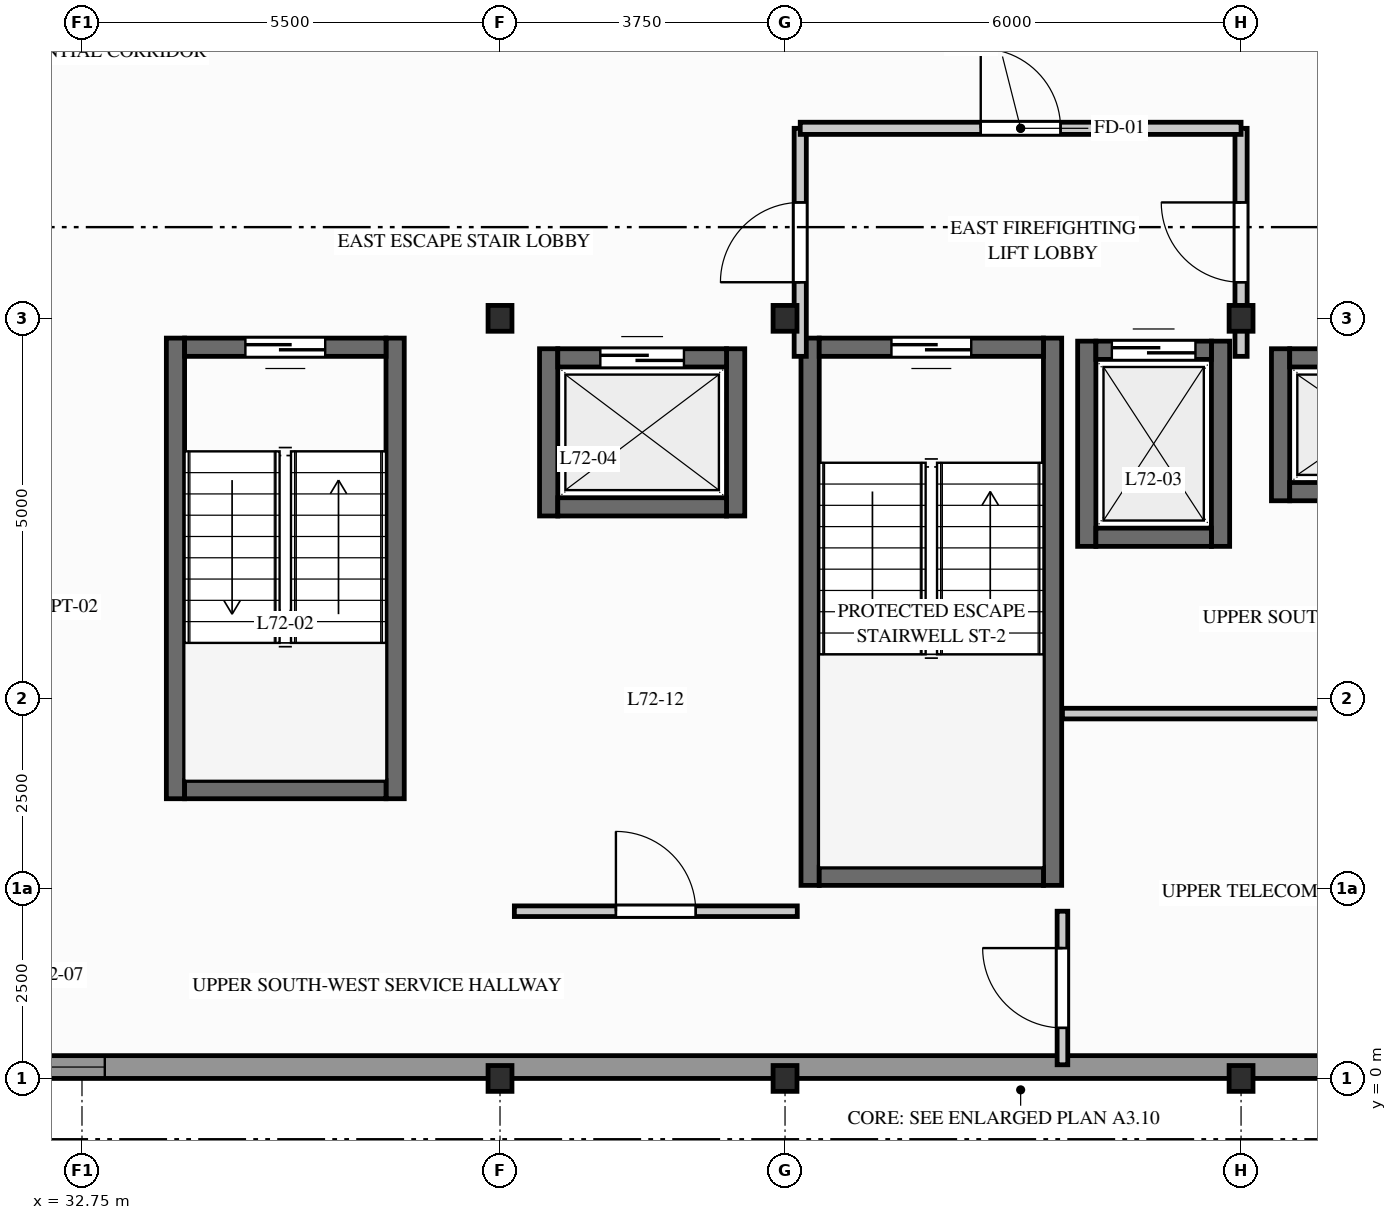
"""IFC4 building model, lengths in metres.
Left out: names, types, materials, properties, quantities, classifications, styles, units other than length and angle.
Written with IfcOpenShell. Run it as: python <this file> out.ifc"""

import sys

from ifc_helpers import new_model, si_unit, direction, frame, frame_2d, origin, origin_2d, place, context, subcontext, project, spatial, rectangle, i_section, extrude, element, fill, save


model = new_model("IFC4")
c1 = context("Model", 3, precision=1e-05, world=origin(), true_north=direction((0.0, 1.0)))
c2 = subcontext(c1, "Body", "Model", "MODEL_VIEW")
j1 = project(units=[si_unit("LENGTHUNIT", "METRE"), si_unit("PLANEANGLEUNIT", "RADIAN")], contexts=[c1])
p1 = place(None, origin())
s1 = spatial("IfcSite", under=j1, at=p1, CompositionType="ELEMENT")
p2 = place(p1, origin())
s2 = spatial("IfcBuilding", under=s1, at=p2, CompositionType="ELEMENT")
p3 = place(p2, frame((0.0, 0.0, 236.6)))
s3 = spatial("IfcBuildingStorey", under=s2, at=p3, CompositionType="ELEMENT", Elevation=236.6)
for number, where, z_axis, x_axis in (
    (1, (38.25, 0.0, 0.0), (0.0, 0.0, 1.0), (1.0, 0.0, 0.0)),
    (2, (38.25, 10.0, 0.0), (0.0, 0.0, 1.0), (1.0, 0.0, 0.0)),
    (3, (42.0, 0.0, 0.0), (0.0, 0.0, 1.0), (1.0, 0.0, 0.0)),
    (4, (42.0, 10.0, 0.0), (0.0, 0.0, 1.0), (1.0, 0.0, 0.0)),
    (5, (48.0, 0.0, 0.0), (0.0, 0.0, 1.0), (1.0, 0.0, 0.0)),
    (6, (48.0, 10.0, 0.0), (0.0, 0.0, 1.0), (1.0, 0.0, 0.0)),
):
    element("IfcColumn", number, at=place(p3, frame(where, z_axis=z_axis, x_axis=x_axis)), inside=s3, PredefinedType="COLUMN", context=c2, shape_type="SweptSolid", body=[
        extrude(i_section(OverallWidth=0.314, OverallDepth=0.34, WebThickness=0.019, FlangeThickness=0.031, FilletRadius=0.015, at=origin_2d()), origin(), (0.0, 0.0, 1.0), 3.45),
    ])
p4 = place(p3, frame((29.75, 0.15, 0.0), z_axis=(0.0, 0.0, 1.0), x_axis=(1.0, 0.0, 0.0)))
e7 = element("IfcWall", 7, at=p4, inside=s3, PredefinedType="STANDARD", context=c2, shape_type="SweptSolid", body=[
    extrude(rectangle(XDim=27.75, YDim=0.3, at=frame_2d((13.875, 0.0))), origin(), (0.0, 0.0, 1.0), 2.635),
])
p5 = place(p4, frame((2.5, 0.0, 1.016)))
e8 = element("IfcOpeningElement", 8, at=p5, cuts=e7, PredefinedType="OPENING", context=c2, shape_type="SweptSolid", body=[
    extrude(rectangle(XDim=0.8, YDim=1.4, at=frame_2d((0.4, 0.7))), frame((0.0, 0.16, 0.0), z_axis=(0.0, -1.0, 0.0), x_axis=(1.0, 0.0, 0.0)), (0.0, 0.0, 1.0), 0.32),
])
p6 = place(p4, frame((19.95, 0.0, 0.616)))
e9 = element("IfcOpeningElement", 9, at=p6, cuts=e7, PredefinedType="OPENING", context=c2, shape_type="SweptSolid", body=[
    extrude(rectangle(XDim=1.5, YDim=1.8, at=frame_2d((0.75, 0.9))), frame((0.0, 0.16, 0.0), z_axis=(0.0, -1.0, 0.0), x_axis=(1.0, 0.0, 0.0)), (0.0, 0.0, 1.0), 0.32),
])
for number, where, z_axis, x_axis in (
    (10, (42.33, 2.54, 0.0), (0.0, 0.0, 1.0), (0.0, 1.0, 0.0)),
    (11, (45.52, 2.54, 0.0), (0.0, 0.0, 1.0), (0.0, 1.0, 0.0)),
):
    element("IfcWall", number, at=place(p3, frame(where, z_axis=z_axis, x_axis=x_axis)), inside=s3, PredefinedType="SHEAR", context=c2, shape_type="SweptSolid", body=[
        extrude(rectangle(XDim=7.2, YDim=0.24, at=frame_2d((3.6, 0.0))), origin(), (0.0, 0.0, 1.0), 3.2),
    ])
p7 = place(p3, frame((42.45, 2.66, 0.0), z_axis=(0.0, 0.0, 1.0), x_axis=(1.0, 0.0, 0.0)))
e12 = element("IfcWall", 12, at=p7, inside=s3, PredefinedType="SHEAR", context=c2, shape_type="SweptSolid", body=[
    extrude(rectangle(XDim=2.95, YDim=0.24, at=frame_2d((1.475, 0.0))), origin(), (0.0, 0.0, 1.0), 3.2),
])
p8 = place(p3, frame((45.4, 9.62, 0.0), z_axis=(0.0, 0.0, 1.0), x_axis=(-1.0, 0.0, 0.0)))
e13 = element("IfcWall", 13, at=p8, inside=s3, PredefinedType="SHEAR", context=c2, shape_type="SweptSolid", body=[
    extrude(rectangle(XDim=2.95, YDim=0.24, at=frame_2d((1.475, 0.0))), origin(), (0.0, 0.0, 1.0), 3.2),
])
p9 = place(p8, frame((0.95, 0.0, 0.0)))
e14 = element("IfcOpeningElement", 14, at=p9, cuts=e13, PredefinedType="OPENING", context=c2, shape_type="SweptSolid", body=[
    extrude(rectangle(XDim=1.05, YDim=2.06, at=frame_2d((0.525, 1.03))), frame((0.0, 0.13, 0.0), z_axis=(0.0, -1.0, 0.0), x_axis=(1.0, 0.0, 0.0)), (0.0, 0.0, 1.0), 0.26),
])
for number, where, z_axis, x_axis in (
    (15, (33.98, 3.68, 0.0), (0.0, 0.0, 1.0), (0.0, 1.0, 0.0)),
    (16, (36.87, 3.68, 0.0), (0.0, 0.0, 1.0), (0.0, 1.0, 0.0)),
):
    element("IfcWall", number, at=place(p3, frame(where, z_axis=z_axis, x_axis=x_axis)), inside=s3, PredefinedType="SHEAR", context=c2, shape_type="SweptSolid", body=[
        extrude(rectangle(XDim=6.06, YDim=0.24, at=frame_2d((3.03, 0.0))), origin(), (0.0, 0.0, 1.0), 3.2),
    ])
p10 = place(p3, frame((34.1, 3.8, 0.0), z_axis=(0.0, 0.0, 1.0), x_axis=(1.0, 0.0, 0.0)))
e17 = element("IfcWall", 17, at=p10, inside=s3, PredefinedType="SHEAR", context=c2, shape_type="SweptSolid", body=[
    extrude(rectangle(XDim=2.65, YDim=0.24, at=frame_2d((1.325, 0.0))), origin(), (0.0, 0.0, 1.0), 3.2),
])
p11 = place(p3, frame((36.75, 9.62, 0.0), z_axis=(0.0, 0.0, 1.0), x_axis=(-1.0, 0.0, 0.0)))
e18 = element("IfcWall", 18, at=p11, inside=s3, PredefinedType="SHEAR", context=c2, shape_type="SweptSolid", body=[
    extrude(rectangle(XDim=2.65, YDim=0.24, at=frame_2d((1.325, 0.0))), origin(), (0.0, 0.0, 1.0), 3.2),
])
p12 = place(p11, frame((0.8, 0.0, 0.0)))
e19 = element("IfcOpeningElement", 19, at=p12, cuts=e18, PredefinedType="OPENING", context=c2, shape_type="SweptSolid", body=[
    extrude(rectangle(XDim=1.05, YDim=2.06, at=frame_2d((0.525, 1.03))), frame((0.0, 0.13, 0.0), z_axis=(0.0, -1.0, 0.0), x_axis=(1.0, 0.0, 0.0)), (0.0, 0.0, 1.0), 0.26),
])
for number, where, z_axis, x_axis in (
    (20, (45.97, 7.0, 0.0), (0.0, 0.0, 1.0), (0.0, 1.0, 0.0)),
    (21, (47.73, 7.0, 0.0), (0.0, 0.0, 1.0), (0.0, 1.0, 0.0)),
):
    element("IfcWall", number, at=place(p3, frame(where, z_axis=z_axis, x_axis=x_axis)), inside=s3, PredefinedType="SHEAR", context=c2, shape_type="SweptSolid", body=[
        extrude(rectangle(XDim=2.7, YDim=0.24, at=frame_2d((1.35, 0.0))), origin(), (0.0, 0.0, 1.0), 3.2),
    ])
p13 = place(p3, frame((46.09, 7.12, 0.0), z_axis=(0.0, 0.0, 1.0), x_axis=(1.0, 0.0, 0.0)))
e22 = element("IfcWall", 22, at=p13, inside=s3, PredefinedType="SHEAR", context=c2, shape_type="SweptSolid", body=[
    extrude(rectangle(XDim=1.52, YDim=0.24, at=frame_2d((0.76, 0.0))), origin(), (0.0, 0.0, 1.0), 3.2),
])
p14 = place(p3, frame((46.09, 9.58, 0.0), z_axis=(0.0, 0.0, 1.0), x_axis=(1.0, 0.0, 0.0)))
e23 = element("IfcWall", 23, at=p14, inside=s3, PredefinedType="SHEAR", context=c2, shape_type="SweptSolid", body=[
    extrude(rectangle(XDim=1.52, YDim=0.24, at=frame_2d((0.76, 0.0))), origin(), (0.0, 0.0, 1.0), 3.2),
])
p15 = place(p14, frame((0.21, 0.0, 0.0)))
e24 = element("IfcOpeningElement", 24, at=p15, cuts=e23, PredefinedType="OPENING", context=c2, shape_type="SweptSolid", body=[
    extrude(rectangle(XDim=1.1, YDim=2.06, at=frame_2d((0.55, 1.03))), frame((0.0, 0.13, 0.0), z_axis=(0.0, -1.0, 0.0), x_axis=(1.0, 0.0, 0.0)), (0.0, 0.0, 1.0), 0.26),
])
for number, where, z_axis, x_axis in (
    (25, (38.89, 7.4, 0.0), (0.0, 0.0, 1.0), (0.0, 1.0, 0.0)),
    (26, (41.35, 7.4, 0.0), (0.0, 0.0, 1.0), (0.0, 1.0, 0.0)),
):
    element("IfcWall", number, at=place(p3, frame(where, z_axis=z_axis, x_axis=x_axis)), inside=s3, PredefinedType="SHEAR", context=c2, shape_type="SweptSolid", body=[
        extrude(rectangle(XDim=2.2, YDim=0.24, at=frame_2d((1.1, 0.0))), origin(), (0.0, 0.0, 1.0), 3.2),
    ])
p16 = place(p3, frame((39.01, 7.52, 0.0), z_axis=(0.0, 0.0, 1.0), x_axis=(1.0, 0.0, 0.0)))
e27 = element("IfcWall", 27, at=p16, inside=s3, PredefinedType="SHEAR", context=c2, shape_type="SweptSolid", body=[
    extrude(rectangle(XDim=2.22, YDim=0.24, at=frame_2d((1.11, 0.0))), origin(), (0.0, 0.0, 1.0), 3.2),
])
p17 = place(p3, frame((39.01, 9.48, 0.0), z_axis=(0.0, 0.0, 1.0), x_axis=(1.0, 0.0, 0.0)))
e28 = element("IfcWall", 28, at=p17, inside=s3, PredefinedType="SHEAR", context=c2, shape_type="SweptSolid", body=[
    extrude(rectangle(XDim=2.22, YDim=0.24, at=frame_2d((1.11, 0.0))), origin(), (0.0, 0.0, 1.0), 3.2),
])
p18 = place(p17, frame((0.56, 0.0, 0.0)))
e29 = element("IfcOpeningElement", 29, at=p18, cuts=e28, PredefinedType="OPENING", context=c2, shape_type="SweptSolid", body=[
    extrude(rectangle(XDim=1.1, YDim=2.06, at=frame_2d((0.55, 1.03))), frame((0.0, 0.13, 0.0), z_axis=(0.0, -1.0, 0.0), x_axis=(1.0, 0.0, 0.0)), (0.0, 0.0, 1.0), 0.26),
])
p19 = place(p3, frame((48.52, 7.6, 0.0), z_axis=(0.0, 0.0, 1.0), x_axis=(0.0, 1.0, 0.0)))
e30 = element("IfcWall", 30, at=p19, inside=s3, PredefinedType="SHEAR", context=c2, shape_type="SweptSolid", body=[
    extrude(rectangle(XDim=2.0, YDim=0.24, at=frame_2d((1.0, 0.0))), origin(), (0.0, 0.0, 1.0), 3.2),
])
p20 = place(p3, frame((48.64, 7.72, 0.0), z_axis=(0.0, 0.0, 1.0), x_axis=(1.0, 0.0, 0.0)))
e31 = element("IfcWall", 31, at=p20, inside=s3, PredefinedType="SHEAR", context=c2, shape_type="SweptSolid", body=[
    extrude(rectangle(XDim=2.12, YDim=0.24, at=frame_2d((1.06, 0.0))), origin(), (0.0, 0.0, 1.0), 3.2),
])
p21 = place(p3, frame((48.64, 9.48, 0.0), z_axis=(0.0, 0.0, 1.0), x_axis=(1.0, 0.0, 0.0)))
e32 = element("IfcWall", 32, at=p21, inside=s3, PredefinedType="SHEAR", context=c2, shape_type="SweptSolid", body=[
    extrude(rectangle(XDim=2.12, YDim=0.24, at=frame_2d((1.06, 0.0))), origin(), (0.0, 0.0, 1.0), 3.2),
])
p22 = place(p21, frame((0.51, 0.0, 0.0)))
e33 = element("IfcOpeningElement", 33, at=p22, cuts=e32, PredefinedType="OPENING", context=c2, shape_type="SweptSolid", body=[
    extrude(rectangle(XDim=1.1, YDim=2.06, at=frame_2d((0.55, 1.03))), frame((0.0, 0.13, 0.0), z_axis=(0.0, -1.0, 0.0), x_axis=(1.0, 0.0, 0.0)), (0.0, 0.0, 1.0), 0.26),
])
p23 = place(p3, frame((38.439, 2.2, 0.0), z_axis=(0.0, 0.0, 1.0), x_axis=(1.0, 0.0, 0.0)))
e34 = element("IfcWall", 34, at=p23, inside=s3, PredefinedType="PARTITIONING", context=c2, shape_type="SweptSolid", body=[
    extrude(rectangle(XDim=3.723, YDim=0.14, at=frame_2d((1.861, 0.0))), origin(), (0.0, 0.0, 1.0), 2.563),
])
p24 = place(p23, frame((1.336, 0.0, 0.0)))
e35 = element("IfcOpeningElement", 35, at=p24, cuts=e34, PredefinedType="OPENING", context=c2, shape_type="SweptSolid", body=[
    extrude(rectangle(XDim=1.05, YDim=2.06, at=frame_2d((0.525, 1.03))), frame((0.0, 0.08, 0.0), z_axis=(0.0, -1.0, 0.0), x_axis=(1.0, 0.0, 0.0)), (0.0, 0.0, 1.0), 0.16),
])
p25 = place(p3, frame((45.65, 0.18, 0.0), z_axis=(0.0, 0.0, 1.0), x_axis=(0.0, 1.0, 0.0)))
e36 = element("IfcWall", 36, at=p25, inside=s3, PredefinedType="PARTITIONING", context=c2, shape_type="SweptSolid", body=[
    extrude(rectangle(XDim=2.02, YDim=0.14, at=frame_2d((1.01, 0.0))), origin(), (0.0, 0.0, 1.0), 3.2),
])
p26 = place(p25, frame((0.485, 0.0, 0.0)))
e37 = element("IfcOpeningElement", 37, at=p26, cuts=e36, PredefinedType="OPENING", context=c2, shape_type="SweptSolid", body=[
    extrude(rectangle(XDim=1.05, YDim=2.06, at=frame_2d((0.525, 1.03))), frame((0.0, 0.08, 0.0), z_axis=(0.0, -1.0, 0.0), x_axis=(1.0, 0.0, 0.0)), (0.0, 0.0, 1.0), 0.16),
])
p27 = place(p3, frame((45.65, 4.8, 0.0), z_axis=(0.0, 0.0, 1.0), x_axis=(1.0, 0.0, 0.0)))
e38 = element("IfcWall", 38, at=p27, inside=s3, PredefinedType="PARTITIONING", context=c2, shape_type="SweptSolid", body=[
    extrude(rectangle(XDim=5.761, YDim=0.14, at=frame_2d((2.881, 0.0))), origin(), (0.0, 0.0, 1.0), 2.563),
])
p28 = place(p3, frame((42.2, 9.5, 0.0), z_axis=(0.0, 0.0, 1.0), x_axis=(0.0, 1.0, 0.0)))
e39 = element("IfcWall", 39, at=p28, inside=s3, PredefinedType="PARTITIONING", context=c2, shape_type="SweptSolid", body=[
    extrude(rectangle(XDim=3.0, YDim=0.16, at=frame_2d((1.5, 0.0))), origin(), (0.0, 0.0, 1.0), 2.139),
])
p29 = place(p28, frame((0.975, 0.0, 0.0)))
e40 = element("IfcOpeningElement", 40, at=p29, cuts=e39, PredefinedType="OPENING", context=c2, shape_type="SweptSolid", body=[
    extrude(rectangle(XDim=1.05, YDim=2.06, at=frame_2d((0.525, 1.03))), frame((0.0, 0.09, 0.0), z_axis=(0.0, -1.0, 0.0), x_axis=(1.0, 0.0, 0.0)), (0.0, 0.0, 1.0), 0.18),
])
p30 = place(p3, frame((48.0, 9.5, 0.0), z_axis=(0.0, 0.0, 1.0), x_axis=(0.0, 1.0, 0.0)))
e41 = element("IfcWall", 41, at=p30, inside=s3, PredefinedType="PARTITIONING", context=c2, shape_type="SweptSolid", body=[
    extrude(rectangle(XDim=3.0, YDim=0.16, at=frame_2d((1.5, 0.0))), origin(), (0.0, 0.0, 1.0), 2.563),
])
p31 = place(p30, frame((0.975, 0.0, 0.0)))
e42 = element("IfcOpeningElement", 42, at=p31, cuts=e41, PredefinedType="OPENING", context=c2, shape_type="SweptSolid", body=[
    extrude(rectangle(XDim=1.05, YDim=2.06, at=frame_2d((0.525, 1.03))), frame((0.0, 0.09, 0.0), z_axis=(0.0, -1.0, 0.0), x_axis=(1.0, 0.0, 0.0)), (0.0, 0.0, 1.0), 0.18),
])
p32 = place(p3, frame((42.2, 12.5, 0.0), z_axis=(0.0, 0.0, 1.0), x_axis=(1.0, 0.0, 0.0)))
e43 = element("IfcWall", 43, at=p32, inside=s3, PredefinedType="PARTITIONING", context=c2, shape_type="SweptSolid", body=[
    extrude(rectangle(XDim=5.8, YDim=0.16, at=frame_2d((2.9, 0.0))), origin(), (0.0, 0.0, 1.0), 2.563),
])
p33 = place(p32, frame((2.375, 0.0, 0.0)))
e44 = element("IfcOpeningElement", 44, at=p33, cuts=e43, PredefinedType="OPENING", context=c2, shape_type="SweptSolid", body=[
    extrude(rectangle(XDim=1.05, YDim=2.06, at=frame_2d((0.525, 1.03))), frame((0.0, 0.09, 0.0), z_axis=(0.0, -1.0, 0.0), x_axis=(1.0, 0.0, 0.0)), (0.0, 0.0, 1.0), 0.18),
])
p34 = place(p5, origin())
e45 = element("IfcWindow", 45, at=p34, inside=s3, PartitioningType="SINGLE_PANEL", PredefinedType="WINDOW", context=c2, shape_type="SweptSolid", body=[
    extrude(rectangle(XDim=0.8, YDim=1.4, at=frame_2d((0.4, 0.7))), frame((0.0, 0.03, 0.0), z_axis=(0.0, -1.0, 0.0), x_axis=(1.0, 0.0, 0.0)), (0.0, 0.0, 1.0), 0.06),
])
fill(e8, e45)
p35 = place(p9, origin())
e46 = element("IfcDoor", 46, at=p35, inside=s3, OperationType="SINGLE_SWING_LEFT", PredefinedType="DOOR", context=c2, shape_type="SweptSolid", body=[
    extrude(rectangle(XDim=1.05, YDim=2.06, at=frame_2d((0.525, 1.03))), frame((0.0, 0.025, 0.0), z_axis=(0.0, -1.0, 0.0), x_axis=(1.0, 0.0, 0.0)), (0.0, 0.0, 1.0), 0.05),
])
fill(e14, e46)
p36 = place(p12, origin())
e47 = element("IfcDoor", 47, at=p36, inside=s3, OperationType="SINGLE_SWING_LEFT", PredefinedType="DOOR", context=c2, shape_type="SweptSolid", body=[
    extrude(rectangle(XDim=1.05, YDim=2.06, at=frame_2d((0.525, 1.03))), frame((0.0, 0.025, 0.0), z_axis=(0.0, -1.0, 0.0), x_axis=(1.0, 0.0, 0.0)), (0.0, 0.0, 1.0), 0.05),
])
fill(e19, e47)
p37 = place(p15, origin())
e48 = element("IfcDoor", 48, at=p37, inside=s3, OperationType="SLIDING_TO_LEFT", PredefinedType="DOOR", context=c2, shape_type="SweptSolid", body=[
    extrude(rectangle(XDim=1.1, YDim=2.06, at=frame_2d((0.55, 1.03))), frame((0.0, 0.025, 0.0), z_axis=(0.0, -1.0, 0.0), x_axis=(1.0, 0.0, 0.0)), (0.0, 0.0, 1.0), 0.05),
])
fill(e24, e48)
p38 = place(p18, origin())
e49 = element("IfcDoor", 49, at=p38, inside=s3, OperationType="SLIDING_TO_RIGHT", PredefinedType="DOOR", context=c2, shape_type="SweptSolid", body=[
    extrude(rectangle(XDim=1.1, YDim=2.06, at=frame_2d((0.55, 1.03))), frame((0.0, 0.025, 0.0), z_axis=(0.0, -1.0, 0.0), x_axis=(1.0, 0.0, 0.0)), (0.0, 0.0, 1.0), 0.05),
])
fill(e29, e49)
p39 = place(p24, origin())
e50 = element("IfcDoor", 50, at=p39, inside=s3, OperationType="SINGLE_SWING_LEFT", PredefinedType="DOOR", context=c2, shape_type="SweptSolid", body=[
    extrude(rectangle(XDim=1.05, YDim=2.06, at=frame_2d((0.525, 1.03))), frame((0.0, 0.025, 0.0), z_axis=(0.0, -1.0, 0.0), x_axis=(1.0, 0.0, 0.0)), (0.0, 0.0, 1.0), 0.05),
])
fill(e35, e50)
p40 = place(p26, origin())
e51 = element("IfcDoor", 51, at=p40, inside=s3, OperationType="SINGLE_SWING_RIGHT", PredefinedType="DOOR", context=c2, shape_type="SweptSolid", body=[
    extrude(rectangle(XDim=1.05, YDim=2.06, at=frame_2d((0.525, 1.03))), frame((0.0, 0.025, 0.0), z_axis=(0.0, -1.0, 0.0), x_axis=(1.0, 0.0, 0.0)), (0.0, 0.0, 1.0), 0.05),
])
fill(e37, e51)
p41 = place(p29, origin())
e52 = element("IfcDoor", 52, at=p41, inside=s3, OperationType="SINGLE_SWING_LEFT", PredefinedType="DOOR", context=c2, shape_type="SweptSolid", body=[
    extrude(rectangle(XDim=1.05, YDim=2.06, at=frame_2d((0.525, 1.03))), frame((0.0, 0.025, 0.0), z_axis=(0.0, -1.0, 0.0), x_axis=(1.0, 0.0, 0.0)), (0.0, 0.0, 1.0), 0.05),
])
fill(e40, e52)
p42 = place(p31, origin())
e53 = element("IfcDoor", 53, at=p42, inside=s3, OperationType="SINGLE_SWING_RIGHT", PredefinedType="DOOR", context=c2, shape_type="SweptSolid", body=[
    extrude(rectangle(XDim=1.05, YDim=2.06, at=frame_2d((0.525, 1.03))), frame((0.0, 0.025, 0.0), z_axis=(0.0, -1.0, 0.0), x_axis=(1.0, 0.0, 0.0)), (0.0, 0.0, 1.0), 0.05),
])
fill(e42, e53)
p43 = place(p33, origin())
e54 = element("IfcDoor", 54, at=p43, inside=s3, OperationType="SINGLE_SWING_LEFT", PredefinedType="DOOR", context=c2, shape_type="SweptSolid", body=[
    extrude(rectangle(XDim=1.05, YDim=2.06, at=frame_2d((0.525, 1.03))), frame((0.0, 0.025, 0.0), z_axis=(0.0, -1.0, 0.0), x_axis=(1.0, 0.0, 0.0)), (0.0, 0.0, 1.0), 0.05),
])
fill(e44, e54)
save(model, sys.argv[1])
